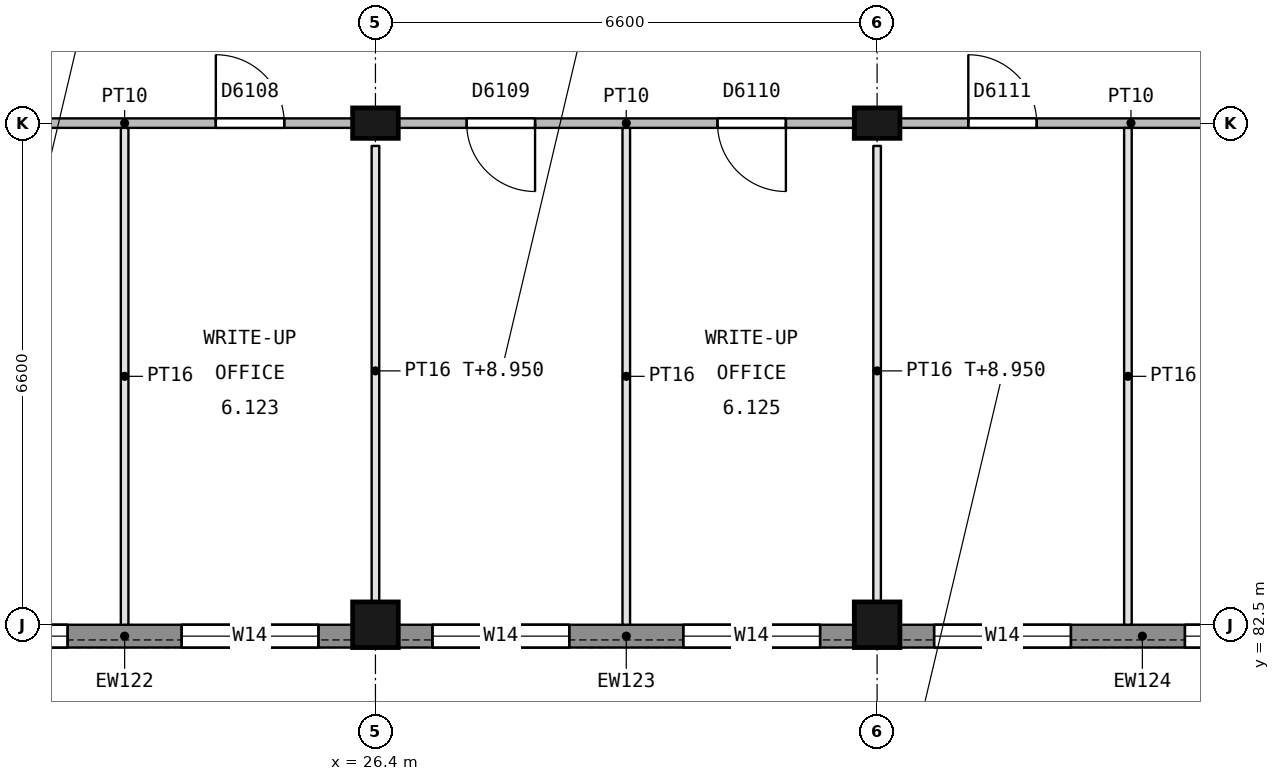
"""IFC4 building model, lengths in metres.
Left out: names, types, materials, properties, quantities, classifications, styles, units other than length and angle.
Written with IfcOpenShell. Run it as: python <this file> out.ifc"""

import sys

from ifc_helpers import new_model, si_unit, direction, frame, frame_2d, origin, origin_2d, place, context, subcontext, project, spatial, rectangle, extrude, element, fill, save


model = new_model("IFC4")
c1 = context("Model", 3, precision=1e-05, world=origin(), true_north=direction((0.0, 1.0)))
c2 = subcontext(c1, "Body", "Model", "MODEL_VIEW")
j1 = project(units=[si_unit("LENGTHUNIT", "METRE"), si_unit("PLANEANGLEUNIT", "RADIAN")], contexts=[c1])
p1 = place(None, origin())
s1 = spatial("IfcSite", under=j1, at=p1, CompositionType="ELEMENT")
p2 = place(p1, origin())
s2 = spatial("IfcBuilding", under=s1, at=p2, CompositionType="ELEMENT")
p3 = place(p2, frame((0.0, 0.0, 5.4)))
s3 = spatial("IfcBuildingStorey", under=s2, at=p3, CompositionType="ELEMENT", Elevation=5.4)
p4 = place(p3, frame((26.4, 82.5, 0.0), z_axis=(0.0, 0.0, 1.0), x_axis=(1.0, 0.0, 0.0)))
e1 = element("IfcColumn", 1, at=p4, inside=s3, PredefinedType="COLUMN", context=c2, shape_type="SweptSolid", body=[
    extrude(rectangle(XDim=0.6, YDim=0.6, at=origin_2d()), origin(), (0.0, 0.0, 1.0), 4.5),
])
p5 = place(p3, frame((26.4, 89.1, 0.0), z_axis=(0.0, 0.0, 1.0), x_axis=(1.0, 0.0, 0.0)))
e2 = element("IfcColumn", 2, at=p5, inside=s3, PredefinedType="COLUMN", context=c2, shape_type="SweptSolid", body=[
    extrude(rectangle(XDim=0.6, YDim=0.4, at=origin_2d()), origin(), (0.0, 0.0, 1.0), 4.5),
])
p6 = place(p3, frame((33.0, 82.5, 0.0), z_axis=(0.0, 0.0, 1.0), x_axis=(1.0, 0.0, 0.0)))
e3 = element("IfcColumn", 3, at=p6, inside=s3, PredefinedType="COLUMN", context=c2, shape_type="SweptSolid", body=[
    extrude(rectangle(XDim=0.6, YDim=0.6, at=origin_2d()), origin(), (0.0, 0.0, 1.0), 4.5),
])
p7 = place(p3, frame((33.0, 89.1, 0.0), z_axis=(0.0, 0.0, 1.0), x_axis=(1.0, 0.0, 0.0)))
e4 = element("IfcColumn", 4, at=p7, inside=s3, PredefinedType="COLUMN", context=c2, shape_type="SweptSolid", body=[
    extrude(rectangle(XDim=0.6, YDim=0.4, at=origin_2d()), origin(), (0.0, 0.0, 1.0), 4.5),
])
p8 = place(p3, frame((26.1, 82.35, 0.0), z_axis=(0.0, 0.0, 1.0), x_axis=(-1.0, 0.0, 0.0)))
e5 = element("IfcWall", 5, at=p8, inside=s3, PredefinedType="STANDARD", context=c2, shape_type="SweptSolid", body=[
    extrude(rectangle(XDim=6.0, YDim=0.3, at=frame_2d((3.0, 0.0))), origin(), (0.0, 0.0, 1.0), 3.65),
])
p9 = place(p8, frame((3.75, 0.0, 0.9)))
e6 = element("IfcOpeningElement", 6, at=p9, cuts=e5, PredefinedType="OPENING", context=c2, shape_type="SweptSolid", body=[
    extrude(rectangle(XDim=1.8, YDim=1.5, at=frame_2d((0.9, 0.75))), frame((0.0, 0.16, 0.0), z_axis=(0.0, -1.0, 0.0), x_axis=(1.0, 0.0, 0.0)), (0.0, 0.0, 1.0), 0.32),
])
p10 = place(p8, frame((0.45, 0.0, 0.9)))
e7 = element("IfcOpeningElement", 7, at=p10, cuts=e5, PredefinedType="OPENING", context=c2, shape_type="SweptSolid", body=[
    extrude(rectangle(XDim=1.8, YDim=1.5, at=frame_2d((0.9, 0.75))), frame((0.0, 0.16, 0.0), z_axis=(0.0, -1.0, 0.0), x_axis=(1.0, 0.0, 0.0)), (0.0, 0.0, 1.0), 0.32),
])
p11 = place(p3, frame((32.7, 82.35, 0.0), z_axis=(0.0, 0.0, 1.0), x_axis=(-1.0, 0.0, 0.0)))
e8 = element("IfcWall", 8, at=p11, inside=s3, PredefinedType="STANDARD", context=c2, shape_type="SweptSolid", body=[
    extrude(rectangle(XDim=6.0, YDim=0.3, at=frame_2d((3.0, 0.0))), origin(), (0.0, 0.0, 1.0), 3.65),
])
p12 = place(p11, frame((3.75, 0.0, 0.9)))
e9 = element("IfcOpeningElement", 9, at=p12, cuts=e8, PredefinedType="OPENING", context=c2, shape_type="SweptSolid", body=[
    extrude(rectangle(XDim=1.8, YDim=1.5, at=frame_2d((0.9, 0.75))), frame((0.0, 0.16, 0.0), z_axis=(0.0, -1.0, 0.0), x_axis=(1.0, 0.0, 0.0)), (0.0, 0.0, 1.0), 0.32),
])
p13 = place(p11, frame((0.45, 0.0, 0.9)))
e10 = element("IfcOpeningElement", 10, at=p13, cuts=e8, PredefinedType="OPENING", context=c2, shape_type="SweptSolid", body=[
    extrude(rectangle(XDim=1.8, YDim=1.5, at=frame_2d((0.9, 0.75))), frame((0.0, 0.16, 0.0), z_axis=(0.0, -1.0, 0.0), x_axis=(1.0, 0.0, 0.0)), (0.0, 0.0, 1.0), 0.32),
])
p14 = place(p3, frame((39.6, 82.35, 0.0), z_axis=(0.0, 0.0, 1.0), x_axis=(-1.0, 0.0, 0.0)))
e11 = element("IfcWall", 11, at=p14, inside=s3, PredefinedType="STANDARD", context=c2, shape_type="SweptSolid", body=[
    extrude(rectangle(XDim=6.3, YDim=0.3, at=frame_2d((3.15, 0.0))), origin(), (0.0, 0.0, 1.0), 3.65),
])
p15 = place(p14, frame((4.05, 0.0, 0.9)))
e12 = element("IfcOpeningElement", 12, at=p15, cuts=e11, PredefinedType="OPENING", context=c2, shape_type="SweptSolid", body=[
    extrude(rectangle(XDim=1.8, YDim=1.5, at=frame_2d((0.9, 0.75))), frame((0.0, 0.16, 0.0), z_axis=(0.0, -1.0, 0.0), x_axis=(1.0, 0.0, 0.0)), (0.0, 0.0, 1.0), 0.32),
])
p16 = place(p14, frame((0.75, 0.0, 0.9)))
e13 = element("IfcOpeningElement", 13, at=p16, cuts=e11, PredefinedType="OPENING", context=c2, shape_type="SweptSolid", body=[
    extrude(rectangle(XDim=1.8, YDim=1.5, at=frame_2d((0.9, 0.75))), frame((0.0, 0.16, 0.0), z_axis=(0.0, -1.0, 0.0), x_axis=(1.0, 0.0, 0.0)), (0.0, 0.0, 1.0), 0.32),
])
p17 = place(p3, frame((26.1, 89.1, 0.0), z_axis=(0.0, 0.0, 1.0), x_axis=(-1.0, 0.0, 0.0)))
e14 = element("IfcWall", 14, at=p17, inside=s3, PredefinedType="PARTITIONING", context=c2, shape_type="SweptSolid", body=[
    extrude(rectangle(XDim=6.0, YDim=0.125, at=frame_2d((3.0, 0.0))), origin(), (0.0, 0.0, 1.0), 3.65),
])
p18 = place(p17, frame((4.2, 0.0, 0.0)))
e15 = element("IfcOpeningElement", 15, at=p18, cuts=e14, PredefinedType="OPENING", context=c2, shape_type="SweptSolid", body=[
    extrude(rectangle(XDim=0.9, YDim=2.1, at=frame_2d((0.45, 1.05))), frame((0.0, 0.073, 0.0), z_axis=(0.0, -1.0, 0.0), x_axis=(1.0, 0.0, 0.0)), (0.0, 0.0, 1.0), 0.145),
])
p19 = place(p17, frame((0.9, 0.0, 0.0)))
e16 = element("IfcOpeningElement", 16, at=p19, cuts=e14, PredefinedType="OPENING", context=c2, shape_type="SweptSolid", body=[
    extrude(rectangle(XDim=0.9, YDim=2.1, at=frame_2d((0.45, 1.05))), frame((0.0, 0.073, 0.0), z_axis=(0.0, -1.0, 0.0), x_axis=(1.0, 0.0, 0.0)), (0.0, 0.0, 1.0), 0.145),
])
p20 = place(p3, frame((32.7, 89.1, 0.0), z_axis=(0.0, 0.0, 1.0), x_axis=(-1.0, 0.0, 0.0)))
e17 = element("IfcWall", 17, at=p20, inside=s3, PredefinedType="PARTITIONING", context=c2, shape_type="SweptSolid", body=[
    extrude(rectangle(XDim=6.0, YDim=0.125, at=frame_2d((3.0, 0.0))), origin(), (0.0, 0.0, 1.0), 3.65),
])
p21 = place(p20, frame((4.2, 0.0, 0.0)))
e18 = element("IfcOpeningElement", 18, at=p21, cuts=e17, PredefinedType="OPENING", context=c2, shape_type="SweptSolid", body=[
    extrude(rectangle(XDim=0.9, YDim=2.1, at=frame_2d((0.45, 1.05))), frame((0.0, 0.073, 0.0), z_axis=(0.0, -1.0, 0.0), x_axis=(1.0, 0.0, 0.0)), (0.0, 0.0, 1.0), 0.145),
])
p22 = place(p20, frame((0.9, 0.0, 0.0)))
e19 = element("IfcOpeningElement", 19, at=p22, cuts=e17, PredefinedType="OPENING", context=c2, shape_type="SweptSolid", body=[
    extrude(rectangle(XDim=0.9, YDim=2.1, at=frame_2d((0.45, 1.05))), frame((0.0, 0.073, 0.0), z_axis=(0.0, -1.0, 0.0), x_axis=(1.0, 0.0, 0.0)), (0.0, 0.0, 1.0), 0.145),
])
p23 = place(p3, frame((39.3, 89.1, 0.0), z_axis=(0.0, 0.0, 1.0), x_axis=(-1.0, 0.0, 0.0)))
e20 = element("IfcWall", 20, at=p23, inside=s3, PredefinedType="PARTITIONING", context=c2, shape_type="SweptSolid", body=[
    extrude(rectangle(XDim=6.0, YDim=0.125, at=frame_2d((3.0, 0.0))), origin(), (0.0, 0.0, 1.0), 3.65),
])
p24 = place(p23, frame((4.2, 0.0, 0.0)))
e21 = element("IfcOpeningElement", 21, at=p24, cuts=e20, PredefinedType="OPENING", context=c2, shape_type="SweptSolid", body=[
    extrude(rectangle(XDim=0.9, YDim=2.1, at=frame_2d((0.45, 1.05))), frame((0.0, 0.073, 0.0), z_axis=(0.0, -1.0, 0.0), x_axis=(1.0, 0.0, 0.0)), (0.0, 0.0, 1.0), 0.145),
])
p25 = place(p23, frame((0.9, 0.0, 0.0)))
e22 = element("IfcOpeningElement", 22, at=p25, cuts=e20, PredefinedType="OPENING", context=c2, shape_type="SweptSolid", body=[
    extrude(rectangle(XDim=0.9, YDim=2.1, at=frame_2d((0.45, 1.05))), frame((0.0, 0.073, 0.0), z_axis=(0.0, -1.0, 0.0), x_axis=(1.0, 0.0, 0.0)), (0.0, 0.0, 1.0), 0.145),
])
p26 = place(p3, frame((23.1, 82.5, 0.0), z_axis=(0.0, 0.0, 1.0), x_axis=(0.0, 1.0, 0.0)))
e23 = element("IfcWall", 23, at=p26, inside=s3, PredefinedType="PARTITIONING", context=c2, shape_type="SweptSolid", body=[
    extrude(rectangle(XDim=6.537, YDim=0.1, at=frame_2d((3.269, 0.0))), origin(), (0.0, 0.0, 1.0), 3.65),
])
p27 = place(p3, frame((26.4, 82.8, 0.0), z_axis=(0.0, 0.0, 1.0), x_axis=(0.0, 1.0, 0.0)))
e24 = element("IfcWall", 24, at=p27, inside=s3, PredefinedType="PARTITIONING", context=c2, shape_type="SweptSolid", body=[
    extrude(rectangle(XDim=6.0, YDim=0.1, at=frame_2d((3.0, 0.0))), origin(), (0.0, 0.0, 1.0), 3.55),
])
p28 = place(p3, frame((29.7, 82.5, 0.0), z_axis=(0.0, 0.0, 1.0), x_axis=(0.0, 1.0, 0.0)))
e25 = element("IfcWall", 25, at=p28, inside=s3, PredefinedType="PARTITIONING", context=c2, shape_type="SweptSolid", body=[
    extrude(rectangle(XDim=6.537, YDim=0.1, at=frame_2d((3.269, 0.0))), origin(), (0.0, 0.0, 1.0), 3.65),
])
p29 = place(p3, frame((33.0, 82.8, 0.0), z_axis=(0.0, 0.0, 1.0), x_axis=(0.0, 1.0, 0.0)))
e26 = element("IfcWall", 26, at=p29, inside=s3, PredefinedType="PARTITIONING", context=c2, shape_type="SweptSolid", body=[
    extrude(rectangle(XDim=6.0, YDim=0.1, at=frame_2d((3.0, 0.0))), origin(), (0.0, 0.0, 1.0), 3.55),
])
p30 = place(p3, frame((36.3, 82.5, 0.0), z_axis=(0.0, 0.0, 1.0), x_axis=(0.0, 1.0, 0.0)))
e27 = element("IfcWall", 27, at=p30, inside=s3, PredefinedType="PARTITIONING", context=c2, shape_type="SweptSolid", body=[
    extrude(rectangle(XDim=6.537, YDim=0.1, at=frame_2d((3.269, 0.0))), origin(), (0.0, 0.0, 1.0), 3.65),
])
p31 = place(p9, origin())
e28 = element("IfcWindow", 28, at=p31, inside=s3, PartitioningType="SINGLE_PANEL", PredefinedType="WINDOW", context=c2, shape_type="SweptSolid", body=[
    extrude(rectangle(XDim=1.8, YDim=1.5, at=frame_2d((0.9, 0.75))), frame((0.0, 0.03, 0.0), z_axis=(0.0, -1.0, 0.0), x_axis=(1.0, 0.0, 0.0)), (0.0, 0.0, 1.0), 0.06),
])
fill(e6, e28)
p32 = place(p10, origin())
e29 = element("IfcWindow", 29, at=p32, inside=s3, PartitioningType="SINGLE_PANEL", PredefinedType="WINDOW", context=c2, shape_type="SweptSolid", body=[
    extrude(rectangle(XDim=1.8, YDim=1.5, at=frame_2d((0.9, 0.75))), frame((0.0, 0.03, 0.0), z_axis=(0.0, -1.0, 0.0), x_axis=(1.0, 0.0, 0.0)), (0.0, 0.0, 1.0), 0.06),
])
fill(e7, e29)
p33 = place(p12, origin())
e30 = element("IfcWindow", 30, at=p33, inside=s3, PartitioningType="SINGLE_PANEL", PredefinedType="WINDOW", context=c2, shape_type="SweptSolid", body=[
    extrude(rectangle(XDim=1.8, YDim=1.5, at=frame_2d((0.9, 0.75))), frame((0.0, 0.03, 0.0), z_axis=(0.0, -1.0, 0.0), x_axis=(1.0, 0.0, 0.0)), (0.0, 0.0, 1.0), 0.06),
])
fill(e9, e30)
p34 = place(p13, origin())
e31 = element("IfcWindow", 31, at=p34, inside=s3, PartitioningType="SINGLE_PANEL", PredefinedType="WINDOW", context=c2, shape_type="SweptSolid", body=[
    extrude(rectangle(XDim=1.8, YDim=1.5, at=frame_2d((0.9, 0.75))), frame((0.0, 0.03, 0.0), z_axis=(0.0, -1.0, 0.0), x_axis=(1.0, 0.0, 0.0)), (0.0, 0.0, 1.0), 0.06),
])
fill(e10, e31)
p35 = place(p15, origin())
e32 = element("IfcWindow", 32, at=p35, inside=s3, PartitioningType="SINGLE_PANEL", PredefinedType="WINDOW", context=c2, shape_type="SweptSolid", body=[
    extrude(rectangle(XDim=1.8, YDim=1.5, at=frame_2d((0.9, 0.75))), frame((0.0, 0.03, 0.0), z_axis=(0.0, -1.0, 0.0), x_axis=(1.0, 0.0, 0.0)), (0.0, 0.0, 1.0), 0.06),
])
fill(e12, e32)
p36 = place(p16, origin())
e33 = element("IfcWindow", 33, at=p36, inside=s3, PartitioningType="SINGLE_PANEL", PredefinedType="WINDOW", context=c2, shape_type="SweptSolid", body=[
    extrude(rectangle(XDim=1.8, YDim=1.5, at=frame_2d((0.9, 0.75))), frame((0.0, 0.03, 0.0), z_axis=(0.0, -1.0, 0.0), x_axis=(1.0, 0.0, 0.0)), (0.0, 0.0, 1.0), 0.06),
])
fill(e13, e33)
p37 = place(p19, origin())
e34 = element("IfcDoor", 34, at=p37, inside=s3, OperationType="SINGLE_SWING_RIGHT", PredefinedType="DOOR", context=c2, shape_type="SweptSolid", body=[
    extrude(rectangle(XDim=0.9, YDim=2.1, at=frame_2d((0.45, 1.05))), frame((0.0, 0.025, 0.0), z_axis=(0.0, -1.0, 0.0), x_axis=(1.0, 0.0, 0.0)), (0.0, 0.0, 1.0), 0.05),
])
fill(e16, e34)
p38 = place(p21, origin())
e35 = element("IfcDoor", 35, at=p38, inside=s3, OperationType="SINGLE_SWING_LEFT", PredefinedType="DOOR", context=c2, shape_type="SweptSolid", body=[
    extrude(rectangle(XDim=0.9, YDim=2.1, at=frame_2d((0.45, 1.05))), frame((0.0, 0.025, 0.0), z_axis=(0.0, -1.0, 0.0), x_axis=(1.0, 0.0, 0.0)), (0.0, 0.0, 1.0), 0.05),
])
fill(e18, e35)
p39 = place(p22, origin())
e36 = element("IfcDoor", 36, at=p39, inside=s3, OperationType="SINGLE_SWING_LEFT", PredefinedType="DOOR", context=c2, shape_type="SweptSolid", body=[
    extrude(rectangle(XDim=0.9, YDim=2.1, at=frame_2d((0.45, 1.05))), frame((0.0, 0.025, 0.0), z_axis=(0.0, -1.0, 0.0), x_axis=(1.0, 0.0, 0.0)), (0.0, 0.0, 1.0), 0.05),
])
fill(e19, e36)
p40 = place(p24, origin())
e37 = element("IfcDoor", 37, at=p40, inside=s3, OperationType="SINGLE_SWING_RIGHT", PredefinedType="DOOR", context=c2, shape_type="SweptSolid", body=[
    extrude(rectangle(XDim=0.9, YDim=2.1, at=frame_2d((0.45, 1.05))), frame((0.0, 0.025, 0.0), z_axis=(0.0, -1.0, 0.0), x_axis=(1.0, 0.0, 0.0)), (0.0, 0.0, 1.0), 0.05),
])
fill(e21, e37)
save(model, sys.argv[1])
